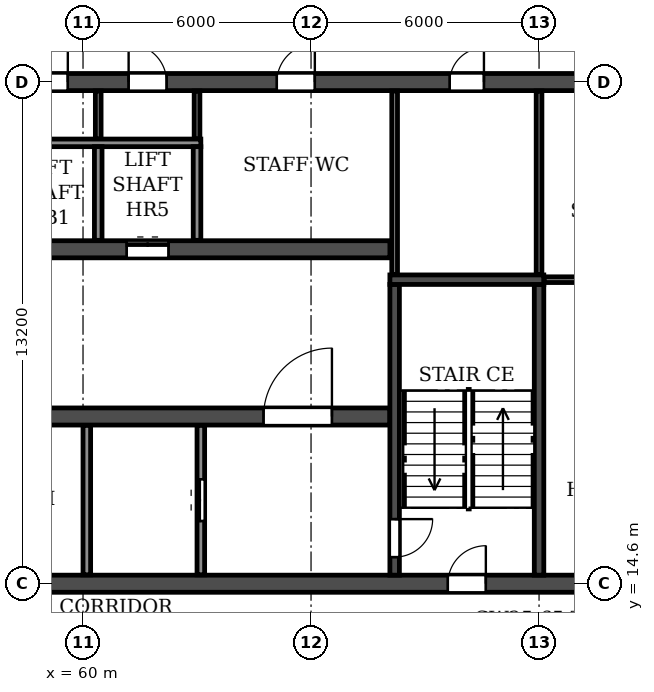
"""IFC4 building model, lengths in metres.
Left out: names, types, materials, properties, quantities, classifications, styles, units other than length and angle.
Written with IfcOpenShell. Run it as: python <this file> out.ifc"""

import sys

from ifc_helpers import new_model, si_unit, direction, frame, frame_2d, origin, place, context, subcontext, project, spatial, rectangle, extrude, element, fill, save


model = new_model("IFC4")
c1 = context("Model", 3, precision=1e-05, world=origin(), true_north=direction((0.0, 1.0)))
c2 = subcontext(c1, "Body", "Model", "MODEL_VIEW")
j1 = project(units=[si_unit("LENGTHUNIT", "METRE"), si_unit("PLANEANGLEUNIT", "RADIAN")], contexts=[c1])
p1 = place(None, origin())
s1 = spatial("IfcSite", under=j1, at=p1, CompositionType="ELEMENT")
p2 = place(p1, origin())
s2 = spatial("IfcBuilding", under=s1, at=p2, CompositionType="ELEMENT")
p3 = place(p2, frame((0.0, 0.0, 158.7)))
s3 = spatial("IfcBuildingStorey", under=s2, at=p3, CompositionType="ELEMENT", Elevation=158.7)
p4 = place(p3, frame((18.2, 14.6, 0.0), z_axis=(0.0, 0.0, 1.0), x_axis=(1.0, 0.0, 0.0)))
e1 = element("IfcWall", 1, at=p4, inside=s3, PredefinedType="SOLIDWALL", context=c2, shape_type="SweptSolid", body=[
    extrude(rectangle(XDim=65.6, YDim=0.45, at=frame_2d((32.8, 0.0))), origin(), (0.0, 0.0, 1.0), 3.07),
])
p5 = place(p4, frame((0.7, 0.0, 0.0)))
e2 = element("IfcOpeningElement", 2, at=p5, cuts=e1, PredefinedType="OPENING", context=c2, shape_type="SweptSolid", body=[
    extrude(rectangle(XDim=1.0, YDim=2.1, at=frame_2d((0.5, 1.05))), frame((0.0, 0.235, 0.0), z_axis=(0.0, -1.0, 0.0), x_axis=(1.0, 0.0, 0.0)), (0.0, 0.0, 1.0), 0.47),
])
p6 = place(p4, frame((8.65, 0.0, 0.0)))
e3 = element("IfcOpeningElement", 3, at=p6, cuts=e1, PredefinedType="OPENING", context=c2, shape_type="SweptSolid", body=[
    extrude(rectangle(XDim=0.9, YDim=2.1, at=frame_2d((0.45, 1.05))), frame((0.0, 0.235, 0.0), z_axis=(0.0, -1.0, 0.0), x_axis=(1.0, 0.0, 0.0)), (0.0, 0.0, 1.0), 0.47),
])
p7 = place(p4, frame((13.2, 0.0, 0.0)))
e4 = element("IfcOpeningElement", 4, at=p7, cuts=e1, PredefinedType="OPENING", context=c2, shape_type="SweptSolid", body=[
    extrude(rectangle(XDim=1.0, YDim=2.1, at=frame_2d((0.5, 1.05))), frame((0.0, 0.235, 0.0), z_axis=(0.0, -1.0, 0.0), x_axis=(1.0, 0.0, 0.0)), (0.0, 0.0, 1.0), 0.47),
])
p8 = place(p4, frame((27.1, 0.0, 0.0)))
e5 = element("IfcOpeningElement", 5, at=p8, cuts=e1, PredefinedType="OPENING", context=c2, shape_type="SweptSolid", body=[
    extrude(rectangle(XDim=1.0, YDim=2.1, at=frame_2d((0.5, 1.05))), frame((0.0, 0.235, 0.0), z_axis=(0.0, -1.0, 0.0), x_axis=(1.0, 0.0, 0.0)), (0.0, 0.0, 1.0), 0.47),
])
p9 = place(p4, frame((32.3, 0.0, 0.0)))
e6 = element("IfcOpeningElement", 6, at=p9, cuts=e1, PredefinedType="OPENING", context=c2, shape_type="SweptSolid", body=[
    extrude(rectangle(XDim=1.0, YDim=2.1, at=frame_2d((0.5, 1.05))), frame((0.0, 0.235, 0.0), z_axis=(0.0, -1.0, 0.0), x_axis=(1.0, 0.0, 0.0)), (0.0, 0.0, 1.0), 0.47),
])
p10 = place(p4, frame((37.25, 0.0, 0.0)))
e7 = element("IfcOpeningElement", 7, at=p10, cuts=e1, PredefinedType="OPENING", context=c2, shape_type="SweptSolid", body=[
    extrude(rectangle(XDim=1.5, YDim=2.1, at=frame_2d((0.75, 1.05))), frame((0.0, 0.235, 0.0), z_axis=(0.0, -1.0, 0.0), x_axis=(1.0, 0.0, 0.0)), (0.0, 0.0, 1.0), 0.47),
])
p11 = place(p4, frame((51.4, 0.0, 0.0)))
e8 = element("IfcOpeningElement", 8, at=p11, cuts=e1, PredefinedType="OPENING", context=c2, shape_type="SweptSolid", body=[
    extrude(rectangle(XDim=1.0, YDim=2.1, at=frame_2d((0.5, 1.05))), frame((0.0, 0.235, 0.0), z_axis=(0.0, -1.0, 0.0), x_axis=(1.0, 0.0, 0.0)), (0.0, 0.0, 1.0), 0.47),
])
p12 = place(p4, frame((56.05, 0.0, 0.0)))
e9 = element("IfcOpeningElement", 9, at=p12, cuts=e1, PredefinedType="OPENING", context=c2, shape_type="SweptSolid", body=[
    extrude(rectangle(XDim=0.9, YDim=2.1, at=frame_2d((0.45, 1.05))), frame((0.0, 0.235, 0.0), z_axis=(0.0, -1.0, 0.0), x_axis=(1.0, 0.0, 0.0)), (0.0, 0.0, 1.0), 0.47),
])
p13 = place(p4, frame((63.9, 0.0, 0.0)))
e10 = element("IfcOpeningElement", 10, at=p13, cuts=e1, PredefinedType="OPENING", context=c2, shape_type="SweptSolid", body=[
    extrude(rectangle(XDim=1.0, YDim=2.1, at=frame_2d((0.5, 1.05))), frame((0.0, 0.235, 0.0), z_axis=(0.0, -1.0, 0.0), x_axis=(1.0, 0.0, 0.0)), (0.0, 0.0, 1.0), 0.47),
])
p14 = place(p3, frame((18.2, 27.8, 0.0), z_axis=(0.0, 0.0, 1.0), x_axis=(1.0, 0.0, 0.0)))
e11 = element("IfcWall", 11, at=p14, inside=s3, PredefinedType="SOLIDWALL", context=c2, shape_type="SweptSolid", body=[
    extrude(rectangle(XDim=65.6, YDim=0.45, at=frame_2d((32.8, 0.0))), origin(), (0.0, 0.0, 1.0), 3.07),
])
p15 = place(p14, frame((0.7, 0.0, 0.0)))
e12 = element("IfcOpeningElement", 12, at=p15, cuts=e11, PredefinedType="OPENING", context=c2, shape_type="SweptSolid", body=[
    extrude(rectangle(XDim=1.0, YDim=2.1, at=frame_2d((0.5, 1.05))), frame((0.0, 0.235, 0.0), z_axis=(0.0, -1.0, 0.0), x_axis=(1.0, 0.0, 0.0)), (0.0, 0.0, 1.0), 0.47),
])
p16 = place(p14, frame((4.05, 0.0, 0.0)))
e13 = element("IfcOpeningElement", 13, at=p16, cuts=e11, PredefinedType="OPENING", context=c2, shape_type="SweptSolid", body=[
    extrude(rectangle(XDim=0.9, YDim=2.1, at=frame_2d((0.45, 1.05))), frame((0.0, 0.235, 0.0), z_axis=(0.0, -1.0, 0.0), x_axis=(1.0, 0.0, 0.0)), (0.0, 0.0, 1.0), 0.47),
])
p17 = place(p14, frame((8.65, 0.0, 0.0)))
e14 = element("IfcOpeningElement", 14, at=p17, cuts=e11, PredefinedType="OPENING", context=c2, shape_type="SweptSolid", body=[
    extrude(rectangle(XDim=0.9, YDim=2.1, at=frame_2d((0.45, 1.05))), frame((0.0, 0.235, 0.0), z_axis=(0.0, -1.0, 0.0), x_axis=(1.0, 0.0, 0.0)), (0.0, 0.0, 1.0), 0.47),
])
p18 = place(p14, frame((13.25, 0.0, 0.0)))
e15 = element("IfcOpeningElement", 15, at=p18, cuts=e11, PredefinedType="OPENING", context=c2, shape_type="SweptSolid", body=[
    extrude(rectangle(XDim=0.9, YDim=2.1, at=frame_2d((0.45, 1.05))), frame((0.0, 0.235, 0.0), z_axis=(0.0, -1.0, 0.0), x_axis=(1.0, 0.0, 0.0)), (0.0, 0.0, 1.0), 0.47),
])
p19 = place(p14, frame((19.0, 0.0, 0.0)))
e16 = element("IfcOpeningElement", 16, at=p19, cuts=e11, PredefinedType="OPENING", context=c2, shape_type="SweptSolid", body=[
    extrude(rectangle(XDim=1.0, YDim=2.1, at=frame_2d((0.5, 1.05))), frame((0.0, 0.235, 0.0), z_axis=(0.0, -1.0, 0.0), x_axis=(1.0, 0.0, 0.0)), (0.0, 0.0, 1.0), 0.47),
])
p20 = place(p14, frame((24.2, 0.0, 0.0)))
e17 = element("IfcOpeningElement", 17, at=p20, cuts=e11, PredefinedType="OPENING", context=c2, shape_type="SweptSolid", body=[
    extrude(rectangle(XDim=1.0, YDim=2.1, at=frame_2d((0.5, 1.05))), frame((0.0, 0.235, 0.0), z_axis=(0.0, -1.0, 0.0), x_axis=(1.0, 0.0, 0.0)), (0.0, 0.0, 1.0), 0.47),
])
p21 = place(p14, frame((29.4, 0.0, 0.0)))
e18 = element("IfcOpeningElement", 18, at=p21, cuts=e11, PredefinedType="OPENING", context=c2, shape_type="SweptSolid", body=[
    extrude(rectangle(XDim=1.0, YDim=2.1, at=frame_2d((0.5, 1.05))), frame((0.0, 0.235, 0.0), z_axis=(0.0, -1.0, 0.0), x_axis=(1.0, 0.0, 0.0)), (0.0, 0.0, 1.0), 0.47),
])
p22 = place(p14, frame((32.3, 0.0, 0.0)))
e19 = element("IfcOpeningElement", 19, at=p22, cuts=e11, PredefinedType="OPENING", context=c2, shape_type="SweptSolid", body=[
    extrude(rectangle(XDim=1.0, YDim=2.1, at=frame_2d((0.5, 1.05))), frame((0.0, 0.235, 0.0), z_axis=(0.0, -1.0, 0.0), x_axis=(1.0, 0.0, 0.0)), (0.0, 0.0, 1.0), 0.47),
])
p23 = place(p14, frame((35.2, 0.0, 0.0)))
e20 = element("IfcOpeningElement", 20, at=p23, cuts=e11, PredefinedType="OPENING", context=c2, shape_type="SweptSolid", body=[
    extrude(rectangle(XDim=1.0, YDim=2.1, at=frame_2d((0.5, 1.05))), frame((0.0, 0.235, 0.0), z_axis=(0.0, -1.0, 0.0), x_axis=(1.0, 0.0, 0.0)), (0.0, 0.0, 1.0), 0.47),
])
p24 = place(p14, frame((37.8, 0.0, 0.0)))
e21 = element("IfcOpeningElement", 21, at=p24, cuts=e11, PredefinedType="OPENING", context=c2, shape_type="SweptSolid", body=[
    extrude(rectangle(XDim=1.0, YDim=2.1, at=frame_2d((0.5, 1.05))), frame((0.0, 0.235, 0.0), z_axis=(0.0, -1.0, 0.0), x_axis=(1.0, 0.0, 0.0)), (0.0, 0.0, 1.0), 0.47),
])
p25 = place(p14, frame((40.4, 0.0, 0.0)))
e22 = element("IfcOpeningElement", 22, at=p25, cuts=e11, PredefinedType="OPENING", context=c2, shape_type="SweptSolid", body=[
    extrude(rectangle(XDim=1.0, YDim=2.1, at=frame_2d((0.5, 1.05))), frame((0.0, 0.235, 0.0), z_axis=(0.0, -1.0, 0.0), x_axis=(1.0, 0.0, 0.0)), (0.0, 0.0, 1.0), 0.47),
])
p26 = place(p14, frame((43.0, 0.0, 0.0)))
e23 = element("IfcOpeningElement", 23, at=p26, cuts=e11, PredefinedType="OPENING", context=c2, shape_type="SweptSolid", body=[
    extrude(rectangle(XDim=1.0, YDim=2.1, at=frame_2d((0.5, 1.05))), frame((0.0, 0.235, 0.0), z_axis=(0.0, -1.0, 0.0), x_axis=(1.0, 0.0, 0.0)), (0.0, 0.0, 1.0), 0.47),
])
p27 = place(p14, frame((46.9, 0.0, 0.0)))
e24 = element("IfcOpeningElement", 24, at=p27, cuts=e11, PredefinedType="OPENING", context=c2, shape_type="SweptSolid", body=[
    extrude(rectangle(XDim=1.0, YDim=2.1, at=frame_2d((0.5, 1.05))), frame((0.0, 0.235, 0.0), z_axis=(0.0, -1.0, 0.0), x_axis=(1.0, 0.0, 0.0)), (0.0, 0.0, 1.0), 0.47),
])
p28 = place(p14, frame((51.45, 0.0, 0.0)))
e25 = element("IfcOpeningElement", 25, at=p28, cuts=e11, PredefinedType="OPENING", context=c2, shape_type="SweptSolid", body=[
    extrude(rectangle(XDim=0.9, YDim=2.1, at=frame_2d((0.45, 1.05))), frame((0.0, 0.235, 0.0), z_axis=(0.0, -1.0, 0.0), x_axis=(1.0, 0.0, 0.0)), (0.0, 0.0, 1.0), 0.47),
])
p29 = place(p14, frame((56.05, 0.0, 0.0)))
e26 = element("IfcOpeningElement", 26, at=p29, cuts=e11, PredefinedType="OPENING", context=c2, shape_type="SweptSolid", body=[
    extrude(rectangle(XDim=0.9, YDim=2.1, at=frame_2d((0.45, 1.05))), frame((0.0, 0.235, 0.0), z_axis=(0.0, -1.0, 0.0), x_axis=(1.0, 0.0, 0.0)), (0.0, 0.0, 1.0), 0.47),
])
p30 = place(p14, frame((60.65, 0.0, 0.0)))
e27 = element("IfcOpeningElement", 27, at=p30, cuts=e11, PredefinedType="OPENING", context=c2, shape_type="SweptSolid", body=[
    extrude(rectangle(XDim=0.9, YDim=2.1, at=frame_2d((0.45, 1.05))), frame((0.0, 0.235, 0.0), z_axis=(0.0, -1.0, 0.0), x_axis=(1.0, 0.0, 0.0)), (0.0, 0.0, 1.0), 0.47),
])
p31 = place(p14, frame((63.9, 0.0, 0.0)))
e28 = element("IfcOpeningElement", 28, at=p31, cuts=e11, PredefinedType="OPENING", context=c2, shape_type="SweptSolid", body=[
    extrude(rectangle(XDim=1.0, YDim=2.1, at=frame_2d((0.5, 1.05))), frame((0.0, 0.235, 0.0), z_axis=(0.0, -1.0, 0.0), x_axis=(1.0, 0.0, 0.0)), (0.0, 0.0, 1.0), 0.47),
])
p32 = place(p3, frame((33.925, 19.0, 0.0), z_axis=(0.0, 0.0, 1.0), x_axis=(1.0, 0.0, 0.0)))
e29 = element("IfcWall", 29, at=p32, inside=s3, PredefinedType="SOLIDWALL", context=c2, shape_type="SweptSolid", body=[
    extrude(rectangle(XDim=34.15, YDim=0.45, at=frame_2d((17.075, 0.0))), origin(), (0.0, 0.0, 1.0), 3.07),
])
p33 = place(p32, frame((16.175, 0.0, 0.0)))
e30 = element("IfcOpeningElement", 30, at=p33, cuts=e29, PredefinedType="OPENING", context=c2, shape_type="SweptSolid", body=[
    extrude(rectangle(XDim=1.8, YDim=2.1, at=frame_2d((0.9, 1.05))), frame((0.0, 0.235, 0.0), z_axis=(0.0, -1.0, 0.0), x_axis=(1.0, 0.0, 0.0)), (0.0, 0.0, 1.0), 0.47),
])
p34 = place(p32, frame((1.525, 0.0, 0.0)))
e31 = element("IfcOpeningElement", 31, at=p34, cuts=e29, PredefinedType="OPENING", context=c2, shape_type="SweptSolid", body=[
    extrude(rectangle(XDim=1.8, YDim=2.1, at=frame_2d((0.9, 1.05))), frame((0.0, 0.235, 0.0), z_axis=(0.0, -1.0, 0.0), x_axis=(1.0, 0.0, 0.0)), (0.0, 0.0, 1.0), 0.47),
])
p35 = place(p32, frame((30.825, 0.0, 0.0)))
e32 = element("IfcOpeningElement", 32, at=p35, cuts=e29, PredefinedType="OPENING", context=c2, shape_type="SweptSolid", body=[
    extrude(rectangle(XDim=1.8, YDim=2.1, at=frame_2d((0.9, 1.05))), frame((0.0, 0.235, 0.0), z_axis=(0.0, -1.0, 0.0), x_axis=(1.0, 0.0, 0.0)), (0.0, 0.0, 1.0), 0.47),
])
p36 = place(p3, frame((33.925, 23.4, 0.0), z_axis=(0.0, 0.0, 1.0), x_axis=(1.0, 0.0, 0.0)))
e33 = element("IfcWall", 33, at=p36, inside=s3, PredefinedType="SOLIDWALL", context=c2, shape_type="SweptSolid", body=[
    extrude(rectangle(XDim=34.15, YDim=0.45, at=frame_2d((17.075, 0.0))), origin(), (0.0, 0.0, 1.0), 3.07),
])
p37 = place(p36, frame((16.175, 0.0, 0.0)))
e34 = element("IfcOpeningElement", 34, at=p37, cuts=e33, PredefinedType="OPENING", context=c2, shape_type="SweptSolid", body=[
    extrude(rectangle(XDim=1.8, YDim=2.1, at=frame_2d((0.9, 1.05))), frame((0.0, 0.235, 0.0), z_axis=(0.0, -1.0, 0.0), x_axis=(1.0, 0.0, 0.0)), (0.0, 0.0, 1.0), 0.47),
])
p38 = place(p36, frame((0.625, 0.0, 0.0)))
e35 = element("IfcOpeningElement", 35, at=p38, cuts=e33, PredefinedType="OPENING", context=c2, shape_type="SweptSolid", body=[
    extrude(rectangle(XDim=1.1, YDim=2.1, at=frame_2d((0.55, 1.05))), frame((0.0, 0.235, 0.0), z_axis=(0.0, -1.0, 0.0), x_axis=(1.0, 0.0, 0.0)), (0.0, 0.0, 1.0), 0.47),
])
p39 = place(p36, frame((3.225, 0.0, 0.0)))
e36 = element("IfcOpeningElement", 36, at=p39, cuts=e33, PredefinedType="OPENING", context=c2, shape_type="SweptSolid", body=[
    extrude(rectangle(XDim=1.1, YDim=2.1, at=frame_2d((0.55, 1.05))), frame((0.0, 0.235, 0.0), z_axis=(0.0, -1.0, 0.0), x_axis=(1.0, 0.0, 0.0)), (0.0, 0.0, 1.0), 0.47),
])
p40 = place(p36, frame((5.825, 0.0, 0.0)))
e37 = element("IfcOpeningElement", 37, at=p40, cuts=e33, PredefinedType="OPENING", context=c2, shape_type="SweptSolid", body=[
    extrude(rectangle(XDim=1.1, YDim=2.1, at=frame_2d((0.55, 1.05))), frame((0.0, 0.235, 0.0), z_axis=(0.0, -1.0, 0.0), x_axis=(1.0, 0.0, 0.0)), (0.0, 0.0, 1.0), 0.47),
])
p41 = place(p36, frame((8.425, 0.0, 0.0)))
e38 = element("IfcOpeningElement", 38, at=p41, cuts=e33, PredefinedType="OPENING", context=c2, shape_type="SweptSolid", body=[
    extrude(rectangle(XDim=1.1, YDim=2.1, at=frame_2d((0.55, 1.05))), frame((0.0, 0.235, 0.0), z_axis=(0.0, -1.0, 0.0), x_axis=(1.0, 0.0, 0.0)), (0.0, 0.0, 1.0), 0.47),
])
p42 = place(p36, frame((11.025, 0.0, 0.0)))
e39 = element("IfcOpeningElement", 39, at=p42, cuts=e33, PredefinedType="OPENING", context=c2, shape_type="SweptSolid", body=[
    extrude(rectangle(XDim=1.1, YDim=2.1, at=frame_2d((0.55, 1.05))), frame((0.0, 0.235, 0.0), z_axis=(0.0, -1.0, 0.0), x_axis=(1.0, 0.0, 0.0)), (0.0, 0.0, 1.0), 0.47),
])
p43 = place(p36, frame((13.625, 0.0, 0.0)))
e40 = element("IfcOpeningElement", 40, at=p43, cuts=e33, PredefinedType="OPENING", context=c2, shape_type="SweptSolid", body=[
    extrude(rectangle(XDim=1.1, YDim=2.1, at=frame_2d((0.55, 1.05))), frame((0.0, 0.235, 0.0), z_axis=(0.0, -1.0, 0.0), x_axis=(1.0, 0.0, 0.0)), (0.0, 0.0, 1.0), 0.47),
])
p44 = place(p36, frame((27.225, 0.0, 0.0)))
e41 = element("IfcOpeningElement", 41, at=p44, cuts=e33, PredefinedType="OPENING", context=c2, shape_type="SweptSolid", body=[
    extrude(rectangle(XDim=1.1, YDim=2.1, at=frame_2d((0.55, 1.05))), frame((0.0, 0.235, 0.0), z_axis=(0.0, -1.0, 0.0), x_axis=(1.0, 0.0, 0.0)), (0.0, 0.0, 1.0), 0.47),
])
p45 = place(p3, frame((68.2, 14.825, 0.0), z_axis=(0.0, 0.0, 1.0), x_axis=(0.0, 1.0, 0.0)))
e42 = element("IfcWall", 42, at=p45, inside=s3, PredefinedType="SOLIDWALL", context=c2, shape_type="SweptSolid", body=[
    extrude(rectangle(XDim=7.65, YDim=0.25, at=frame_2d((3.825, 0.0))), origin(), (0.0, 0.0, 1.0), 3.07),
])
p46 = place(p45, frame((0.475, 0.0, 0.0)))
e43 = element("IfcOpeningElement", 43, at=p46, cuts=e42, PredefinedType="OPENING", context=c2, shape_type="SweptSolid", body=[
    extrude(rectangle(XDim=1.0, YDim=2.1, at=frame_2d((0.5, 1.05))), frame((0.0, 0.135, 0.0), z_axis=(0.0, -1.0, 0.0), x_axis=(1.0, 0.0, 0.0)), (0.0, 0.0, 1.0), 0.27),
])
p47 = place(p3, frame((72.0, 14.825, 0.0), z_axis=(0.0, 0.0, 1.0), x_axis=(0.0, 1.0, 0.0)))
e44 = element("IfcWall", 44, at=p47, inside=s3, PredefinedType="SOLIDWALL", context=c2, shape_type="SweptSolid", body=[
    extrude(rectangle(XDim=7.65, YDim=0.25, at=frame_2d((3.825, 0.0))), origin(), (0.0, 0.0, 1.0), 3.07),
])
p48 = place(p3, frame((68.075, 22.6, 0.0), z_axis=(0.0, 0.0, 1.0), x_axis=(1.0, 0.0, 0.0)))
e45 = element("IfcWall", 45, at=p48, inside=s3, PredefinedType="SOLIDWALL", context=c2, shape_type="SweptSolid", body=[
    extrude(rectangle(XDim=4.05, YDim=0.25, at=frame_2d((2.025, 0.0))), origin(), (0.0, 0.0, 1.0), 3.07),
])
p49 = place(p3, frame((72.135, 22.6, 0.0), z_axis=(0.0, 0.0, 1.0), x_axis=(1.0, 0.0, 0.0)))
e46 = element("IfcWall", 46, at=p49, inside=s3, PredefinedType="PARTITIONING", context=c2, shape_type="SweptSolid", body=[
    extrude(rectangle(XDim=5.13, YDim=0.15, at=frame_2d((2.565, 0.0))), origin(), (0.0, 0.0, 1.0), 3.07),
])
for number, where, z_axis, x_axis in (
    (47, (60.4, 26.3, 0.0), (0.0, 0.0, 1.0), (0.0, 1.0, 0.0)),
    (48, (63.0, 26.3, 0.0), (0.0, 0.0, 1.0), (0.0, 1.0, 0.0)),
):
    element("IfcWall", number, at=place(p3, frame(where, z_axis=z_axis, x_axis=x_axis)), inside=s3, PredefinedType="PARTITIONING", context=c2, shape_type="SweptSolid", body=[
        extrude(rectangle(XDim=1.265, YDim=0.15, at=frame_2d((0.632, 0.0))), origin(), (0.0, 0.0, 1.0), 3.07),
    ])
for number, where, z_axis, x_axis in (
    (49, (68.2, 22.735, 0.0), (0.0, 0.0, 1.0), (0.0, 1.0, 0.0)),
    (50, (72.0, 22.735, 0.0), (0.0, 0.0, 1.0), (0.0, 1.0, 0.0)),
):
    element("IfcWall", number, at=place(p3, frame(where, z_axis=z_axis, x_axis=x_axis)), inside=s3, PredefinedType="PARTITIONING", context=c2, shape_type="SweptSolid", body=[
        extrude(rectangle(XDim=4.83, YDim=0.15, at=frame_2d((2.415, 0.0))), origin(), (0.0, 0.0, 1.0), 3.07),
    ])
p50 = place(p3, frame((57.7, 26.2, 0.0), z_axis=(0.0, 0.0, 1.0), x_axis=(1.0, 0.0, 0.0)))
e51 = element("IfcWall", 51, at=p50, inside=s3, PredefinedType="PARTITIONING", context=c2, shape_type="SweptSolid", body=[
    extrude(rectangle(XDim=5.4, YDim=0.2, at=frame_2d((2.7, 0.0))), origin(), (0.0, 0.0, 1.0), 3.07),
])
p51 = place(p3, frame((60.1, 14.835, 0.0), z_axis=(0.0, 0.0, 1.0), x_axis=(0.0, 1.0, 0.0)))
e52 = element("IfcWall", 52, at=p51, inside=s3, PredefinedType="PARTITIONING", context=c2, shape_type="SweptSolid", body=[
    extrude(rectangle(XDim=3.93, YDim=0.2, at=frame_2d((1.965, 0.0))), origin(), (0.0, 0.0, 1.0), 3.07),
])
for number, where, z_axis, x_axis in (
    (53, (60.4, 23.635, 0.0), (0.0, 0.0, 1.0), (0.0, 1.0, 0.0)),
    (54, (63.0, 23.635, 0.0), (0.0, 0.0, 1.0), (0.0, 1.0, 0.0)),
):
    element("IfcWall", number, at=place(p3, frame(where, z_axis=z_axis, x_axis=x_axis)), inside=s3, PredefinedType="PARTITIONING", context=c2, shape_type="SweptSolid", body=[
        extrude(rectangle(XDim=2.465, YDim=0.2, at=frame_2d((1.232, 0.0))), origin(), (0.0, 0.0, 1.0), 3.07),
    ])
p52 = place(p3, frame((63.1, 14.835, 0.0), z_axis=(0.0, 0.0, 1.0), x_axis=(0.0, 1.0, 0.0)))
e55 = element("IfcWall", 55, at=p52, inside=s3, PredefinedType="PARTITIONING", context=c2, shape_type="SweptSolid", body=[
    extrude(rectangle(XDim=3.93, YDim=0.2, at=frame_2d((1.965, 0.0))), origin(), (0.0, 0.0, 1.0), 3.07),
])
p53 = place(p52, frame((1.415, 0.0, 0.0)))
e56 = element("IfcOpeningElement", 56, at=p53, cuts=e55, PredefinedType="OPENING", context=c2, shape_type="SweptSolid", body=[
    extrude(rectangle(XDim=1.1, YDim=2.1, at=frame_2d((0.55, 1.05))), frame((0.0, 0.11, 0.0), z_axis=(0.0, -1.0, 0.0), x_axis=(1.0, 0.0, 0.0)), (0.0, 0.0, 1.0), 0.22),
])
p54 = place(p25, origin())
e57 = element("IfcDoor", 57, at=p54, inside=s3, OperationType="SINGLE_SWING_RIGHT", PredefinedType="DOOR", context=c2, shape_type="SweptSolid", body=[
    extrude(rectangle(XDim=1.0, YDim=2.1, at=frame_2d((0.5, 1.05))), frame((0.0, 0.025, 0.0), z_axis=(0.0, -1.0, 0.0), x_axis=(1.0, 0.0, 0.0)), (0.0, 0.0, 1.0), 0.05),
])
fill(e22, e57)
p55 = place(p26, origin())
e58 = element("IfcDoor", 58, at=p55, inside=s3, OperationType="SINGLE_SWING_LEFT", PredefinedType="DOOR", context=c2, shape_type="SweptSolid", body=[
    extrude(rectangle(XDim=1.0, YDim=2.1, at=frame_2d((0.5, 1.05))), frame((0.0, 0.025, 0.0), z_axis=(0.0, -1.0, 0.0), x_axis=(1.0, 0.0, 0.0)), (0.0, 0.0, 1.0), 0.05),
])
fill(e23, e58)
p56 = place(p27, origin())
e59 = element("IfcDoor", 59, at=p56, inside=s3, OperationType="SINGLE_SWING_RIGHT", PredefinedType="DOOR", context=c2, shape_type="SweptSolid", body=[
    extrude(rectangle(XDim=1.0, YDim=2.1, at=frame_2d((0.5, 1.05))), frame((0.0, 0.025, 0.0), z_axis=(0.0, -1.0, 0.0), x_axis=(1.0, 0.0, 0.0)), (0.0, 0.0, 1.0), 0.05),
])
fill(e24, e59)
p57 = place(p28, origin())
e60 = element("IfcDoor", 60, at=p57, inside=s3, OperationType="SINGLE_SWING_RIGHT", PredefinedType="DOOR", context=c2, shape_type="SweptSolid", body=[
    extrude(rectangle(XDim=0.9, YDim=2.1, at=frame_2d((0.45, 1.05))), frame((0.0, 0.025, 0.0), z_axis=(0.0, -1.0, 0.0), x_axis=(1.0, 0.0, 0.0)), (0.0, 0.0, 1.0), 0.05),
])
fill(e25, e60)
p58 = place(p11, origin())
e61 = element("IfcDoor", 61, at=p58, inside=s3, OperationType="SINGLE_SWING_RIGHT", PredefinedType="DOOR", context=c2, shape_type="SweptSolid", body=[
    extrude(rectangle(XDim=1.0, YDim=2.1, at=frame_2d((0.5, 1.05))), frame((0.0, 0.025, 0.0), z_axis=(0.0, -1.0, 0.0), x_axis=(1.0, 0.0, 0.0)), (0.0, 0.0, 1.0), 0.05),
])
fill(e8, e61)
p59 = place(p53, origin())
e62 = element("IfcDoor", 62, at=p59, inside=s3, OperationType="DOUBLE_DOOR_SLIDING", PredefinedType="DOOR", context=c2, shape_type="SweptSolid", body=[
    extrude(rectangle(XDim=1.1, YDim=2.1, at=frame_2d((0.55, 1.05))), frame((0.0, 0.025, 0.0), z_axis=(0.0, -1.0, 0.0), x_axis=(1.0, 0.0, 0.0)), (0.0, 0.0, 1.0), 0.05),
])
fill(e56, e62)
p60 = place(p46, frame((1.0, 0.0, 0.0), z_axis=(0.0, 0.0, 1.0), x_axis=(-1.0, 0.0, 0.0)))
e63 = element("IfcDoor", 63, at=p60, inside=s3, OperationType="SINGLE_SWING_LEFT", PredefinedType="DOOR", context=c2, shape_type="SweptSolid", body=[
    extrude(rectangle(XDim=1.0, YDim=2.1, at=frame_2d((0.5, 1.05))), frame((0.0, 0.025, 0.0), z_axis=(0.0, -1.0, 0.0), x_axis=(1.0, 0.0, 0.0)), (0.0, 0.0, 1.0), 0.05),
])
fill(e43, e63)
p61 = place(p44, origin())
e64 = element("IfcDoor", 64, at=p61, inside=s3, OperationType="DOUBLE_DOOR_SLIDING", PredefinedType="DOOR", context=c2, shape_type="SweptSolid", body=[
    extrude(rectangle(XDim=1.1, YDim=2.1, at=frame_2d((0.55, 1.05))), frame((0.0, 0.025, 0.0), z_axis=(0.0, -1.0, 0.0), x_axis=(1.0, 0.0, 0.0)), (0.0, 0.0, 1.0), 0.05),
])
fill(e41, e64)
p62 = place(p35, origin())
e65 = element("IfcDoor", 65, at=p62, inside=s3, OperationType="DOUBLE_DOOR_SINGLE_SWING", PredefinedType="DOOR", context=c2, shape_type="SweptSolid", body=[
    extrude(rectangle(XDim=1.8, YDim=2.1, at=frame_2d((0.9, 1.05))), frame((0.0, 0.025, 0.0), z_axis=(0.0, -1.0, 0.0), x_axis=(1.0, 0.0, 0.0)), (0.0, 0.0, 1.0), 0.05),
])
fill(e32, e65)
save(model, sys.argv[1])
